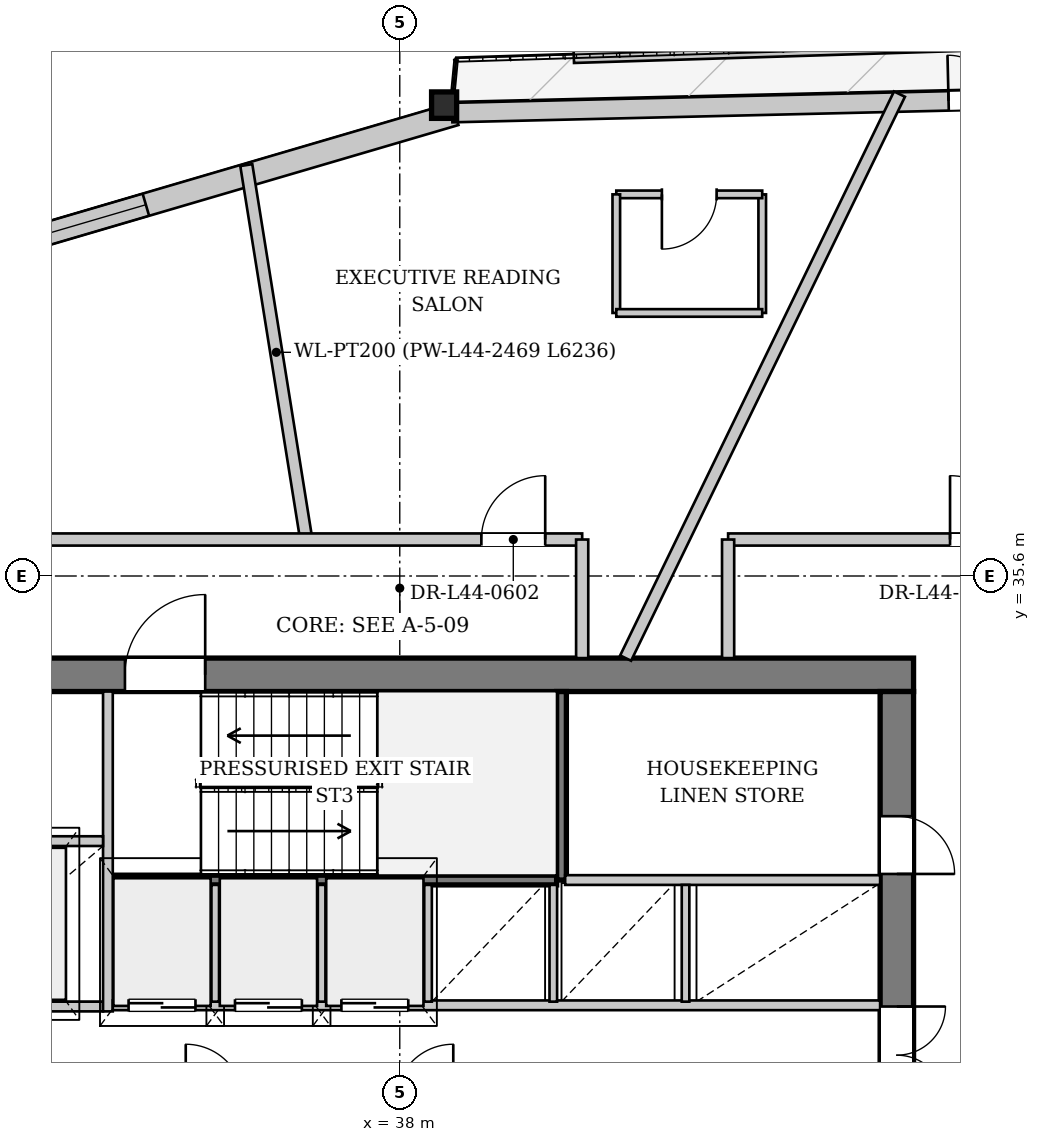
"""IFC4 building model, lengths in metres.
Left out: names, types, materials, properties, quantities, classifications, styles, units other than length and angle.
Written with IfcOpenShell. Run it as: python <this file> out.ifc"""

import sys

from ifc_helpers import new_model, si_unit, direction, frame, frame_2d, origin, origin_2d, place, context, subcontext, project, spatial, rectangle, i_section, extrude, source, transform, mapped, element, fill, save


model = new_model("IFC4")
c1 = context("Model", 3, precision=1e-05, world=origin(), true_north=direction((0.0, 1.0)))
c2 = subcontext(c1, "Body", "Model", "MODEL_VIEW")
j1 = project(units=[si_unit("LENGTHUNIT", "METRE"), si_unit("PLANEANGLEUNIT", "RADIAN")], contexts=[c1])
p1 = place(None, origin())
s1 = spatial("IfcSite", under=j1, at=p1, CompositionType="ELEMENT")
p2 = place(p1, origin())
s2 = spatial("IfcBuilding", under=s1, at=p2, CompositionType="ELEMENT")
p3 = place(p2, frame((0.0, 0.0, 167.9)))
s3 = spatial("IfcBuildingStorey", under=s2, at=p3, CompositionType="ELEMENT", Elevation=167.9)
m1 = source(origin(), c2, "Body", "SweptSolid", [
    extrude(i_section(OverallWidth=0.412, OverallDepth=0.435, WebThickness=0.031, FlangeThickness=0.05, at=origin_2d()), origin(), (0.0, 0.0, 1.0), 3.396),
])
p4 = place(p3, frame((38.858, 43.381, 0.0), z_axis=(-0.075996034496, -0.022072641997, 0.996863782679), x_axis=(0.278918309756, -0.96031483196, 0.0)))
e1 = element("IfcColumn", 1, at=p4, inside=s3, PredefinedType="COLUMN", context=c2, shape_type="MappedRepresentation", body=[
    mapped(m1, transform((0.0, 0.0, 0.0), x_axis=(1.0, 0.0, 0.0), y_axis=(0.0, 1.0, 0.0), z_axis=(0.0, 0.0, 1.0), scale=1.0)),
])
p5 = place(p3, frame((16.974, 36.761, 0.0), z_axis=(0.0, 0.0, 1.0), x_axis=(0.959540288507, 0.281571367032, 0.0)))
e2 = element("IfcWall", 2, at=p5, inside=s3, PredefinedType="SOLIDWALL", context=c2, shape_type="SweptSolid", body=[
    extrude(rectangle(XDim=22.863, YDim=0.38, at=frame_2d((11.431, 0.0))), origin(), (0.0, 0.0, 1.0), 2.722),
])
p6 = place(p5, frame((5.302, 0.0, 0.352)))
e3 = element("IfcOpeningElement", 3, at=p6, cuts=e2, PredefinedType="OPENING", context=c2, shape_type="SweptSolid", body=[
    extrude(rectangle(XDim=2.2, YDim=2.25, at=frame_2d((1.1, 1.125))), frame((0.0, 0.2, 0.0), z_axis=(0.0, -1.0, 0.0), x_axis=(1.0, 0.0, 0.0)), (0.0, 0.0, 1.0), 0.4),
])
p7 = place(p5, frame((15.361, 0.0, 0.352)))
e4 = element("IfcOpeningElement", 4, at=p7, cuts=e2, PredefinedType="OPENING", context=c2, shape_type="SweptSolid", body=[
    extrude(rectangle(XDim=2.2, YDim=2.25, at=frame_2d((1.1, 1.125))), frame((0.0, 0.2, 0.0), z_axis=(0.0, -1.0, 0.0), x_axis=(1.0, 0.0, 0.0)), (0.0, 0.0, 1.0), 0.4),
])
p8 = place(p3, frame((38.862, 43.221, 0.0), z_axis=(0.0, 0.0, 1.0), x_axis=(0.999721247149, 0.023609913133, 0.0)))
e5 = element("IfcWall", 5, at=p8, inside=s3, PredefinedType="SOLIDWALL", context=c2, shape_type="SweptSolid", body=[
    extrude(rectangle(XDim=22.863, YDim=0.32, at=frame_2d((11.432, 0.0))), origin(), (0.0, 0.0, 1.0), 2.722),
])
p9 = place(p8, frame((8.166, 0.0, 0.0)))
e6 = element("IfcOpeningElement", 6, at=p9, cuts=e5, PredefinedType="OPENING", context=c2, shape_type="SweptSolid", body=[
    extrude(rectangle(XDim=1.5, YDim=2.3, at=frame_2d((0.75, 1.15))), frame((0.0, 0.17, 0.0), z_axis=(0.0, -1.0, 0.0), x_axis=(1.0, 0.0, 0.0)), (0.0, 0.0, 1.0), 0.34),
])
p10 = place(p8, frame((15.619, 0.0, 0.252)))
e7 = element("IfcOpeningElement", 7, at=p10, cuts=e5, PredefinedType="OPENING", context=c2, shape_type="SweptSolid", body=[
    extrude(rectangle(XDim=2.6, YDim=2.35, at=frame_2d((1.3, 1.175))), frame((0.0, 0.17, 0.0), z_axis=(0.0, -1.0, 0.0), x_axis=(1.0, 0.0, 0.0)), (0.0, 0.0, 1.0), 0.34),
])
p11 = place(p3, frame((61.2, 44.778, 0.0), z_axis=(0.0, 0.0, 1.0), x_axis=(-0.999519608931, -0.030992763077, 0.0)))
e8 = element("IfcWall", 8, at=p11, inside=s3, PredefinedType="PARAPET", context=c2, shape_type="SweptSolid", body=[
    extrude(rectangle(XDim=20.347, YDim=0.22, at=frame_2d((10.174, 0.0))), origin(), (0.0, 0.0, 1.0), 0.3),
])
p12 = place(p3, frame((29.55, 33.975, 0.0), z_axis=(0.0, 0.0, 1.0), x_axis=(1.0, 0.0, 0.0)))
e9 = element("IfcWall", 9, at=p12, inside=s3, PredefinedType="SHEAR", context=c2, shape_type="SweptSolid", body=[
    extrude(rectangle(XDim=16.9, YDim=0.55, at=frame_2d((8.45, 0.0))), origin(), (0.0, 0.0, 1.0), 3.33),
])
p13 = place(p12, frame((1.55, 0.0, 0.0)))
e10 = element("IfcOpeningElement", 10, at=p13, cuts=e9, PredefinedType="OPENING", context=c2, shape_type="SweptSolid", body=[
    extrude(rectangle(XDim=0.95, YDim=2.1, at=frame_2d((0.475, 1.05))), frame((0.0, 0.285, 0.0), z_axis=(0.0, -1.0, 0.0), x_axis=(1.0, 0.0, 0.0)), (0.0, 0.0, 1.0), 0.57),
])
p14 = place(p12, frame((3.93, 0.0, 0.0)))
e11 = element("IfcOpeningElement", 11, at=p14, cuts=e9, PredefinedType="OPENING", context=c2, shape_type="SweptSolid", body=[
    extrude(rectangle(XDim=1.32, YDim=2.2, at=frame_2d((0.66, 1.1))), frame((0.0, 0.285, 0.0), z_axis=(0.0, -1.0, 0.0), x_axis=(1.0, 0.0, 0.0)), (0.0, 0.0, 1.0), 0.57),
])
p15 = place(p3, frame((46.175, 33.7, 0.0), z_axis=(0.0, 0.0, 1.0), x_axis=(0.0, -1.0, 0.0)))
e12 = element("IfcWall", 12, at=p15, inside=s3, PredefinedType="SHEAR", context=c2, shape_type="SweptSolid", body=[
    extrude(rectangle(XDim=14.2, YDim=0.55, at=frame_2d((7.1, 0.0))), origin(), (0.0, 0.0, 1.0), 3.33),
])
p16 = place(p15, frame((5.18, 0.0, 0.0)))
e13 = element("IfcOpeningElement", 13, at=p16, cuts=e12, PredefinedType="OPENING", context=c2, shape_type="SweptSolid", body=[
    extrude(rectangle(XDim=1.6, YDim=2.2, at=frame_2d((0.8, 1.1))), frame((0.0, 0.285, 0.0), z_axis=(0.0, -1.0, 0.0), x_axis=(1.0, 0.0, 0.0)), (0.0, 0.0, 1.0), 0.57),
])
p17 = place(p15, frame((2.05, 0.0, 0.0)))
e14 = element("IfcOpeningElement", 14, at=p17, cuts=e12, PredefinedType="OPENING", context=c2, shape_type="SweptSolid", body=[
    extrude(rectangle(XDim=0.95, YDim=2.1, at=frame_2d((0.475, 1.05))), frame((0.0, 0.285, 0.0), z_axis=(0.0, -1.0, 0.0), x_axis=(1.0, 0.0, 0.0)), (0.0, 0.0, 1.0), 0.57),
])
p18 = place(p3, frame((33.28, 30.6, 0.0), z_axis=(0.0, 0.0, 1.0), x_axis=(1.0, 0.0, 0.0)))
e15 = element("IfcWall", 15, at=p18, inside=s3, PredefinedType="PARTITIONING", context=c2, shape_type="SweptSolid", body=[
    extrude(rectangle(XDim=7.3, YDim=0.16, at=frame_2d((3.65, 0.0))), origin(), (0.0, 0.0, 1.0), 3.33),
])
p19 = place(p3, frame((40.66, 30.6, 0.0), z_axis=(0.0, 0.0, 1.0), x_axis=(0.0, 1.0, 0.0)))
e16 = element("IfcWall", 16, at=p19, inside=s3, PredefinedType="PARTITIONING", context=c2, shape_type="SweptSolid", body=[
    extrude(rectangle(XDim=3.1, YDim=0.16, at=frame_2d((1.55, 0.0))), origin(), (0.0, 0.0, 1.0), 3.33),
])
p20 = place(p3, frame((30.1, 28.52, 0.0), z_axis=(0.0, 0.0, 1.0), x_axis=(1.0, 0.0, 0.0)))
e17 = element("IfcWall", 17, at=p20, inside=s3, PredefinedType="PARTITIONING", context=c2, shape_type="SweptSolid", body=[
    extrude(rectangle(XDim=3.02, YDim=0.16, at=frame_2d((1.51, 0.0))), origin(), (0.0, 0.0, 1.0), 3.33),
])
p21 = place(p3, frame((33.2, 28.44, 0.0), z_axis=(0.0, 0.0, 1.0), x_axis=(0.0, 1.0, 0.0)))
e18 = element("IfcWall", 18, at=p21, inside=s3, PredefinedType="PARTITIONING", context=c2, shape_type="SweptSolid", body=[
    extrude(rectangle(XDim=5.26, YDim=0.16, at=frame_2d((2.63, 0.0))), origin(), (0.0, 0.0, 1.0), 3.33),
])
p22 = place(p3, frame((30.1, 31.24, 0.0), z_axis=(0.0, 0.0, 1.0), x_axis=(1.0, 0.0, 0.0)))
e19 = element("IfcWall", 19, at=p22, inside=s3, PredefinedType="PARTITIONING", context=c2, shape_type="SweptSolid", body=[
    extrude(rectangle(XDim=3.02, YDim=0.16, at=frame_2d((1.51, 0.0))), origin(), (0.0, 0.0, 1.0), 3.33),
])
p23 = place(p22, frame((0.91, 0.0, 0.0)))
e20 = element("IfcOpeningElement", 20, at=p23, cuts=e19, PredefinedType="OPENING", context=c2, shape_type="SweptSolid", body=[
    extrude(rectangle(XDim=1.2, YDim=2.2, at=frame_2d((0.6, 1.1))), frame((0.0, 0.09, 0.0), z_axis=(0.0, -1.0, 0.0), x_axis=(1.0, 0.0, 0.0)), (0.0, 0.0, 1.0), 0.18),
])
p24 = place(p3, frame((33.28, 28.54, 0.0), z_axis=(0.0, 0.0, 1.0), x_axis=(1.0, 0.0, 0.0)))
e21 = element("IfcWall", 21, at=p24, inside=s3, PredefinedType="PARTITIONING", context=c2, shape_type="SweptSolid", body=[
    extrude(rectangle(XDim=12.62, YDim=0.16, at=frame_2d((6.31, 0.0))), origin(), (0.0, 0.0, 1.0), 3.33),
])
p25 = place(p24, frame((0.26, 0.0, 0.0)))
e22 = element("IfcOpeningElement", 22, at=p25, cuts=e21, PredefinedType="OPENING", context=c2, shape_type="SweptSolid", body=[
    extrude(rectangle(XDim=1.1, YDim=2.2, at=frame_2d((0.55, 1.1))), frame((0.0, 0.09, 0.0), z_axis=(0.0, -1.0, 0.0), x_axis=(1.0, 0.0, 0.0)), (0.0, 0.0, 1.0), 0.18),
])
p26 = place(p24, frame((2.01, 0.0, 0.0)))
e23 = element("IfcOpeningElement", 23, at=p26, cuts=e21, PredefinedType="OPENING", context=c2, shape_type="SweptSolid", body=[
    extrude(rectangle(XDim=1.1, YDim=2.2, at=frame_2d((0.55, 1.1))), frame((0.0, 0.09, 0.0), z_axis=(0.0, -1.0, 0.0), x_axis=(1.0, 0.0, 0.0)), (0.0, 0.0, 1.0), 0.18),
])
p27 = place(p24, frame((3.76, 0.0, 0.0)))
e24 = element("IfcOpeningElement", 24, at=p27, cuts=e21, PredefinedType="OPENING", context=c2, shape_type="SweptSolid", body=[
    extrude(rectangle(XDim=1.1, YDim=2.2, at=frame_2d((0.55, 1.1))), frame((0.0, 0.09, 0.0), z_axis=(0.0, -1.0, 0.0), x_axis=(1.0, 0.0, 0.0)), (0.0, 0.0, 1.0), 0.18),
])
p28 = place(p3, frame((40.72, 30.6, 0.0), z_axis=(0.0, 0.0, 1.0), x_axis=(1.0, 0.0, 0.0)))
e25 = element("IfcWall", 25, at=p28, inside=s3, PredefinedType="PARTITIONING", context=c2, shape_type="SweptSolid", body=[
    extrude(rectangle(XDim=5.18, YDim=0.16, at=frame_2d((2.59, 0.0))), origin(), (0.0, 0.0, 1.0), 3.33),
])
for number, where, z_axis, x_axis in (
    (26, (34.965, 28.6, 0.0), (0.0, 0.0, 1.0), (0.0, 1.0, 0.0)),
    (27, (36.715, 28.6, 0.0), (0.0, 0.0, 1.0), (0.0, 1.0, 0.0)),
    (28, (38.465, 28.6, 0.0), (0.0, 0.0, 1.0), (0.0, 1.0, 0.0)),
    (29, (40.525, 28.6, 0.0), (0.0, 0.0, 1.0), (0.0, 1.0, 0.0)),
    (30, (42.7, 28.6, 0.0), (0.0, 0.0, 1.0), (0.0, 1.0, 0.0)),
):
    element("IfcWall", number, at=place(p3, frame(where, z_axis=z_axis, x_axis=x_axis)), inside=s3, PredefinedType="PARTITIONING", context=c2, shape_type="SweptSolid", body=[
        extrude(rectangle(XDim=1.92, YDim=0.125, at=frame_2d((0.96, 0.0))), origin(), (0.0, 0.0, 1.0), 3.33),
    ])
p29 = place(p3, frame((36.462, 36.2, 0.0), z_axis=(0.0, 0.0, 1.0), x_axis=(-0.158173736678, 0.987411296788, 0.0)))
e31 = element("IfcWall", 31, at=p29, inside=s3, PredefinedType="PARTITIONING", context=c2, shape_type="SweptSolid", body=[
    extrude(rectangle(XDim=6.236, YDim=0.2, at=frame_2d((3.118, 0.0))), origin(), (0.0, 0.0, 1.0), 3.33),
])
p30 = place(p3, frame((41.715, 34.25, 0.0), z_axis=(0.0, 0.0, 1.0), x_axis=(0.436811995944, 0.899552822351, 0.0)))
e32 = element("IfcWall", 32, at=p30, inside=s3, PredefinedType="PARTITIONING", context=c2, shape_type="SweptSolid", body=[
    extrude(rectangle(XDim=10.31, YDim=0.2, at=frame_2d((5.155, 0.0))), origin(), (0.0, 0.0, 1.0), 3.33),
])
p31 = place(p3, frame((43.961, 39.926, 0.0), z_axis=(0.0, 0.0, 1.0), x_axis=(0.0, 1.0, 0.0)))
e33 = element("IfcWall", 33, at=p31, inside=s3, PredefinedType="PARTITIONING", context=c2, shape_type="SweptSolid", body=[
    extrude(rectangle(XDim=1.95, YDim=0.125, at=frame_2d((0.975, 0.0))), origin(), (0.0, 0.0, 1.0), 3.33),
])
p32 = place(p3, frame((43.961, 41.876, 0.0), z_axis=(0.0, 0.0, 1.0), x_axis=(-1.0, 0.0, 0.0)))
e34 = element("IfcWall", 34, at=p32, inside=s3, PredefinedType="PARTITIONING", context=c2, shape_type="SweptSolid", body=[
    extrude(rectangle(XDim=2.4, YDim=0.125, at=frame_2d((1.2, 0.0))), origin(), (0.0, 0.0, 1.0), 3.33),
])
p33 = place(p32, frame((0.75, 0.0, 0.0)))
e35 = element("IfcOpeningElement", 35, at=p33, cuts=e34, PredefinedType="OPENING", context=c2, shape_type="SweptSolid", body=[
    extrude(rectangle(XDim=0.9, YDim=2.1, at=frame_2d((0.45, 1.05))), frame((0.0, 0.073, 0.0), z_axis=(0.0, -1.0, 0.0), x_axis=(1.0, 0.0, 0.0)), (0.0, 0.0, 1.0), 0.145),
])
p34 = place(p3, frame((41.561, 41.876, 0.0), z_axis=(0.0, 0.0, 1.0), x_axis=(0.0, -1.0, 0.0)))
e36 = element("IfcWall", 36, at=p34, inside=s3, PredefinedType="PARTITIONING", context=c2, shape_type="SweptSolid", body=[
    extrude(rectangle(XDim=1.95, YDim=0.125, at=frame_2d((0.975, 0.0))), origin(), (0.0, 0.0, 1.0), 3.33),
])
p35 = place(p3, frame((41.561, 39.926, 0.0), z_axis=(0.0, 0.0, 1.0), x_axis=(1.0, 0.0, 0.0)))
e37 = element("IfcWall", 37, at=p35, inside=s3, PredefinedType="PARTITIONING", context=c2, shape_type="SweptSolid", body=[
    extrude(rectangle(XDim=2.4, YDim=0.125, at=frame_2d((1.2, 0.0))), origin(), (0.0, 0.0, 1.0), 3.075),
])
p36 = place(p3, frame((27.6, 36.2, 0.0), z_axis=(0.0, 0.0, 1.0), x_axis=(1.0, 0.0, 0.0)))
e38 = element("IfcWall", 38, at=p36, inside=s3, PredefinedType="PARTITIONING", context=c2, shape_type="SweptSolid", body=[
    extrude(rectangle(XDim=13.4, YDim=0.2, at=frame_2d((6.7, 0.0))), origin(), (0.0, 0.0, 1.0), 3.33),
])
p37 = place(p36, frame((11.742, 0.0, 0.0)))
e39 = element("IfcOpeningElement", 39, at=p37, cuts=e38, PredefinedType="OPENING", context=c2, shape_type="SweptSolid", body=[
    extrude(rectangle(XDim=1.05, YDim=2.2, at=frame_2d((0.525, 1.1))), frame((0.0, 0.11, 0.0), z_axis=(0.0, -1.0, 0.0), x_axis=(1.0, 0.0, 0.0)), (0.0, 0.0, 1.0), 0.22),
])
p38 = place(p3, frame((41.0, 34.25, 0.0), z_axis=(0.0, 0.0, 1.0), x_axis=(0.0, 1.0, 0.0)))
e40 = element("IfcWall", 40, at=p38, inside=s3, PredefinedType="PARTITIONING", context=c2, shape_type="SweptSolid", body=[
    extrude(rectangle(XDim=1.95, YDim=0.2, at=frame_2d((0.975, 0.0))), origin(), (0.0, 0.0, 1.0), 3.33),
])
p39 = place(p3, frame((43.4, 36.2, 0.0), z_axis=(0.0, 0.0, 1.0), x_axis=(1.0, 0.0, 0.0)))
e41 = element("IfcWall", 41, at=p39, inside=s3, PredefinedType="PARTITIONING", context=c2, shape_type="SweptSolid", body=[
    extrude(rectangle(XDim=5.0, YDim=0.2, at=frame_2d((2.5, 0.0))), origin(), (0.0, 0.0, 1.0), 3.33),
])
p40 = place(p39, frame((3.65, 0.0, 0.0)))
e42 = element("IfcOpeningElement", 42, at=p40, cuts=e41, PredefinedType="OPENING", context=c2, shape_type="SweptSolid", body=[
    extrude(rectangle(XDim=1.05, YDim=2.2, at=frame_2d((0.525, 1.1))), frame((0.0, 0.11, 0.0), z_axis=(0.0, -1.0, 0.0), x_axis=(1.0, 0.0, 0.0)), (0.0, 0.0, 1.0), 0.22),
])
p41 = place(p3, frame((43.4, 34.25, 0.0), z_axis=(0.0, 0.0, 1.0), x_axis=(0.0, 1.0, 0.0)))
e43 = element("IfcWall", 43, at=p41, inside=s3, PredefinedType="PARTITIONING", context=c2, shape_type="SweptSolid", body=[
    extrude(rectangle(XDim=1.95, YDim=0.2, at=frame_2d((0.975, 0.0))), origin(), (0.0, 0.0, 1.0), 3.33),
])
m2 = source(origin(), c2, "Body", "SweptSolid", [
    extrude(rectangle(XDim=2.2, YDim=2.25, at=frame_2d((1.1, 1.125))), frame((0.0, 0.03, 0.0), z_axis=(0.0, -1.0, 0.0), x_axis=(1.0, 0.0, 0.0)), (0.0, 0.0, 1.0), 0.06),
])
p42 = place(p7, origin())
e44 = element("IfcWindow", 44, at=p42, inside=s3, PartitioningType="SINGLE_PANEL", PredefinedType="WINDOW", context=c2, shape_type="MappedRepresentation", body=[
    mapped(m2, transform((0.0, 0.0, 0.0), x_axis=(1.0, 0.0, 0.0), y_axis=(0.0, 1.0, 0.0), z_axis=(0.0, 0.0, 1.0), scale=1.0)),
])
fill(e4, e44)
m3 = source(origin(), c2, "Body", "SweptSolid", [
    extrude(rectangle(XDim=1.5, YDim=2.3, at=frame_2d((0.75, 1.15))), frame((0.0, 0.025, 0.0), z_axis=(0.0, -1.0, 0.0), x_axis=(1.0, 0.0, 0.0)), (0.0, 0.0, 1.0), 0.05),
])
p43 = place(p9, origin())
e45 = element("IfcDoor", 45, at=p43, inside=s3, OperationType="DOUBLE_DOOR_SINGLE_SWING", PredefinedType="DOOR", context=c2, shape_type="MappedRepresentation", body=[
    mapped(m3, transform((0.0, 0.0, 0.0), x_axis=(1.0, 0.0, 0.0), y_axis=(0.0, 1.0, 0.0), z_axis=(0.0, 0.0, 1.0), scale=1.0)),
])
fill(e6, e45)
m4 = source(origin(), c2, "Body", "SweptSolid", [
    extrude(rectangle(XDim=1.32, YDim=2.2, at=frame_2d((0.66, 1.1))), frame((0.0, 0.025, 0.0), z_axis=(0.0, -1.0, 0.0), x_axis=(1.0, 0.0, 0.0)), (0.0, 0.0, 1.0), 0.05),
])
p44 = place(p14, origin())
e46 = element("IfcDoor", 46, at=p44, inside=s3, OperationType="SINGLE_SWING_RIGHT", PredefinedType="DOOR", context=c2, shape_type="MappedRepresentation", body=[
    mapped(m4, transform((0.0, 0.0, 0.0), x_axis=(1.0, 0.0, 0.0), y_axis=(0.0, 1.0, 0.0), z_axis=(0.0, 0.0, 1.0), scale=1.0)),
])
fill(e11, e46)
m5 = source(origin(), c2, "Body", "SweptSolid", [
    extrude(rectangle(XDim=1.6, YDim=2.2, at=frame_2d((0.8, 1.1))), frame((0.0, 0.025, 0.0), z_axis=(0.0, -1.0, 0.0), x_axis=(1.0, 0.0, 0.0)), (0.0, 0.0, 1.0), 0.05),
])
p45 = place(p16, origin())
e47 = element("IfcDoor", 47, at=p45, inside=s3, OperationType="DOUBLE_DOOR_SINGLE_SWING", PredefinedType="DOOR", context=c2, shape_type="MappedRepresentation", body=[
    mapped(m5, transform((0.0, 0.0, 0.0), x_axis=(1.0, 0.0, 0.0), y_axis=(0.0, 1.0, 0.0), z_axis=(0.0, 0.0, 1.0), scale=1.0)),
])
fill(e13, e47)
m6 = source(origin(), c2, "Body", "SweptSolid", [
    extrude(rectangle(XDim=1.1, YDim=2.2, at=frame_2d((0.55, 1.1))), frame((0.0, 0.025, 0.0), z_axis=(0.0, -1.0, 0.0), x_axis=(1.0, 0.0, 0.0)), (0.0, 0.0, 1.0), 0.05),
])
p46 = place(p25, origin())
e48 = element("IfcDoor", 48, at=p46, inside=s3, OperationType="DOUBLE_DOOR_SLIDING", PredefinedType="DOOR", context=c2, shape_type="MappedRepresentation", body=[
    mapped(m6, transform((0.0, 0.0, 0.0), x_axis=(1.0, 0.0, 0.0), y_axis=(0.0, 1.0, 0.0), z_axis=(0.0, 0.0, 1.0), scale=1.0)),
])
fill(e22, e48)
p47 = place(p26, origin())
e49 = element("IfcDoor", 49, at=p47, inside=s3, OperationType="DOUBLE_DOOR_SLIDING", PredefinedType="DOOR", context=c2, shape_type="MappedRepresentation", body=[
    mapped(m6, transform((0.0, 0.0, 0.0), x_axis=(1.0, 0.0, 0.0), y_axis=(0.0, 1.0, 0.0), z_axis=(0.0, 0.0, 1.0), scale=1.0)),
])
fill(e23, e49)
p48 = place(p27, origin())
e50 = element("IfcDoor", 50, at=p48, inside=s3, OperationType="DOUBLE_DOOR_SLIDING", PredefinedType="DOOR", context=c2, shape_type="MappedRepresentation", body=[
    mapped(m6, transform((0.0, 0.0, 0.0), x_axis=(1.0, 0.0, 0.0), y_axis=(0.0, 1.0, 0.0), z_axis=(0.0, 0.0, 1.0), scale=1.0)),
])
fill(e24, e50)
m7 = source(origin(), c2, "Body", "SweptSolid", [
    extrude(rectangle(XDim=0.95, YDim=2.1, at=frame_2d((0.475, 1.05))), frame((0.0, 0.025, 0.0), z_axis=(0.0, -1.0, 0.0), x_axis=(1.0, 0.0, 0.0)), (0.0, 0.0, 1.0), 0.05),
])
p49 = place(p17, origin())
e51 = element("IfcDoor", 51, at=p49, inside=s3, OperationType="SINGLE_SWING_RIGHT", PredefinedType="DOOR", context=c2, shape_type="MappedRepresentation", body=[
    mapped(m7, transform((0.0, 0.0, 0.0), x_axis=(1.0, 0.0, 0.0), y_axis=(0.0, 1.0, 0.0), z_axis=(0.0, 0.0, 1.0), scale=1.0)),
])
fill(e14, e51)
m8 = source(origin(), c2, "Body", "SweptSolid", [
    extrude(rectangle(XDim=0.9, YDim=2.1, at=frame_2d((0.45, 1.05))), frame((0.0, 0.025, 0.0), z_axis=(0.0, -1.0, 0.0), x_axis=(1.0, 0.0, 0.0)), (0.0, 0.0, 1.0), 0.05),
])
p50 = place(p33, origin())
e52 = element("IfcDoor", 52, at=p50, inside=s3, OperationType="SINGLE_SWING_RIGHT", PredefinedType="DOOR", context=c2, shape_type="MappedRepresentation", body=[
    mapped(m8, transform((0.0, 0.0, 0.0), x_axis=(1.0, 0.0, 0.0), y_axis=(0.0, 1.0, 0.0), z_axis=(0.0, 0.0, 1.0), scale=1.0)),
])
fill(e35, e52)
m9 = source(origin(), c2, "Body", "SweptSolid", [
    extrude(rectangle(XDim=1.05, YDim=2.2, at=frame_2d((0.525, 1.1))), frame((0.0, 0.025, 0.0), z_axis=(0.0, -1.0, 0.0), x_axis=(1.0, 0.0, 0.0)), (0.0, 0.0, 1.0), 0.05),
])
p51 = place(p37, origin())
e53 = element("IfcDoor", 53, at=p51, inside=s3, OperationType="SINGLE_SWING_RIGHT", PredefinedType="DOOR", context=c2, shape_type="MappedRepresentation", body=[
    mapped(m9, transform((0.0, 0.0, 0.0), x_axis=(1.0, 0.0, 0.0), y_axis=(0.0, 1.0, 0.0), z_axis=(0.0, 0.0, 1.0), scale=1.0)),
])
fill(e39, e53)
p52 = place(p40, origin())
e54 = element("IfcDoor", 54, at=p52, inside=s3, OperationType="SINGLE_SWING_LEFT", PredefinedType="DOOR", context=c2, shape_type="MappedRepresentation", body=[
    mapped(m9, transform((0.0, 0.0, 0.0), x_axis=(1.0, 0.0, 0.0), y_axis=(0.0, 1.0, 0.0), z_axis=(0.0, 0.0, 1.0), scale=1.0)),
])
fill(e42, e54)
save(model, sys.argv[1])
